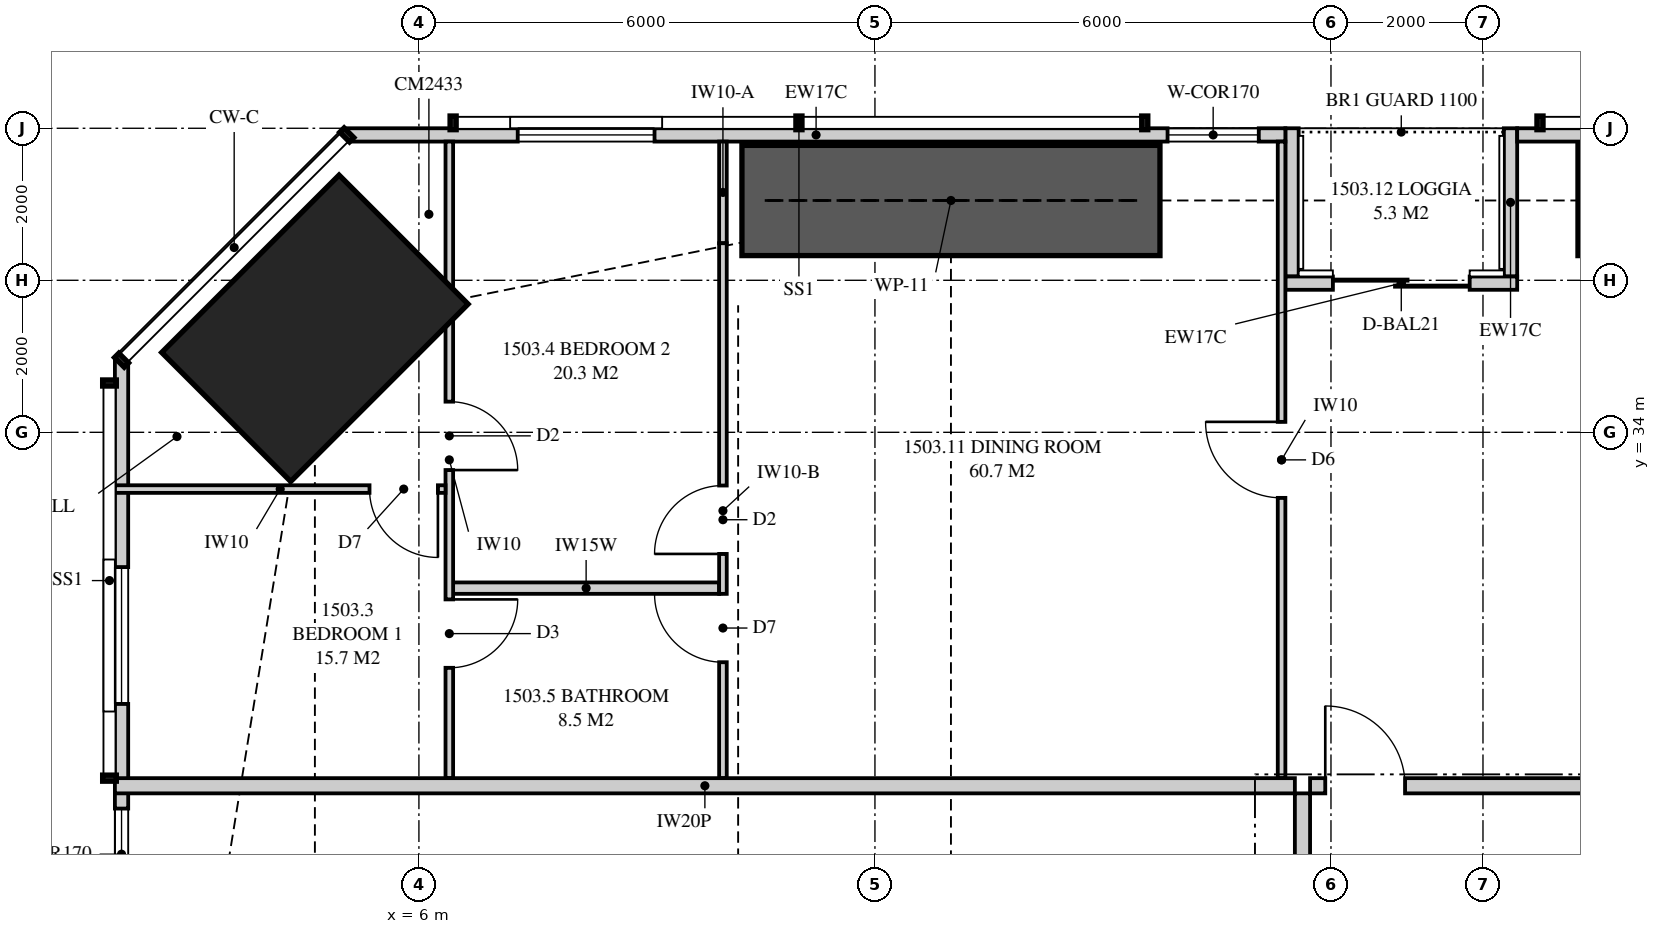
"""IFC4 building model, lengths in metres.
Left out: names, types, materials, properties, quantities, classifications, styles, units other than length and angle.
Written with IfcOpenShell. Run it as: python <this file> out.ifc"""

import sys

from ifc_helpers import new_model, si_unit, direction, frame, frame_2d, origin, origin_2d, place, context, subcontext, project, spatial, polyline, rectangle, outline, extrude, element, fill, save


model = new_model("IFC4")
c1 = context("Model", 3, precision=1e-05, world=origin(), true_north=direction((0.0, 1.0)))
c2 = subcontext(c1, "Body", "Model", "MODEL_VIEW")
j1 = project(units=[si_unit("LENGTHUNIT", "METRE"), si_unit("PLANEANGLEUNIT", "RADIAN")], contexts=[c1])
p1 = place(None, origin())
s1 = spatial("IfcSite", under=j1, at=p1, CompositionType="ELEMENT")
p2 = place(p1, origin())
s2 = spatial("IfcBuilding", under=s1, at=p2, CompositionType="ELEMENT")
p3 = place(p2, frame((0.0, 0.0, 57.85)))
s3 = spatial("IfcBuildingStorey", under=s2, at=p3, CompositionType="ELEMENT", Elevation=57.85)
p4 = place(p3, frame((4.631, 35.369, 0.0), z_axis=(0.0, 0.0, 1.0), x_axis=(0.707106781187, -0.707106781187, 0.0)))
e1 = element("IfcColumn", 1, at=p4, inside=s3, PredefinedType="COLUMN", context=c2, shape_type="SweptSolid", body=[
    extrude(rectangle(XDim=2.4, YDim=3.3, at=origin_2d()), origin(), (0.0, 0.0, 1.0), 3.35),
])
p5 = place(p3, frame((37.824, 37.913, 0.0), z_axis=(0.0, 0.0, 1.0), x_axis=(-1.0, 0.0, 0.0)))
e2 = element("IfcWall", 2, at=p5, inside=s3, PredefinedType="SOLIDWALL", context=c2, shape_type="SweptSolid", body=[
    extrude(outline(polyline([(0.0, 0.0), (17.374, 0.0), (17.374, 2.15), (2.824, 2.15), (2.824, 3.11), (2.668, 3.11), (2.668, 2.15), (2.62, 2.15), (2.62, 3.11), (0.0, 3.11), (0.0, 0.0)])), frame((0.0, 0.087, 0.0), z_axis=(0.0, -1.0, 0.0), x_axis=(1.0, 0.0, 0.0)), (0.0, 0.0, 1.0), 0.175),
])
p6 = place(p5, frame((5.699, 0.0, 0.4)))
e3 = element("IfcOpeningElement", 3, at=p6, cuts=e2, PredefinedType="OPENING", context=c2, shape_type="SweptSolid", body=[
    extrude(rectangle(XDim=1.8, YDim=1.7, at=frame_2d((0.9, 0.85))), frame((0.0, 0.097, 0.0), z_axis=(0.0, -1.0, 0.0), x_axis=(1.0, 0.0, 0.0)), (0.0, 0.0, 1.0), 0.195),
])
p7 = place(p5, frame((9.124, 0.0, 0.4)))
e4 = element("IfcOpeningElement", 4, at=p7, cuts=e2, PredefinedType="OPENING", context=c2, shape_type="SweptSolid", body=[
    extrude(rectangle(XDim=1.8, YDim=1.7, at=frame_2d((0.9, 0.85))), frame((0.0, 0.097, 0.0), z_axis=(0.0, -1.0, 0.0), x_axis=(1.0, 0.0, 0.0)), (0.0, 0.0, 1.0), 0.195),
])
p8 = place(p3, frame((17.4, 37.913, 0.0), z_axis=(0.0, 0.0, 1.0), x_axis=(-1.0, 0.0, 0.0)))
e5 = element("IfcWall", 5, at=p8, inside=s3, PredefinedType="SOLIDWALL", context=c2, shape_type="SweptSolid", body=[
    extrude(outline(polyline([(0.0, 0.0), (12.349, 0.0), (12.349, 3.11), (4.604, 3.11), (4.604, 2.15), (4.556, 2.15), (4.556, 3.11), (4.4, 3.11), (4.4, 2.15), (0.0, 2.15), (0.0, 0.0)])), frame((0.0, 0.087, 0.0), z_axis=(0.0, -1.0, 0.0), x_axis=(1.0, 0.0, 0.0)), (0.0, 0.0, 1.0), 0.175),
])
p9 = place(p8, frame((0.35, 0.0, 0.4)))
e6 = element("IfcOpeningElement", 6, at=p9, cuts=e5, PredefinedType="OPENING", context=c2, shape_type="SweptSolid", body=[
    extrude(rectangle(XDim=1.2, YDim=1.7, at=frame_2d((0.6, 0.85))), frame((0.0, 0.097, 0.0), z_axis=(0.0, -1.0, 0.0), x_axis=(1.0, 0.0, 0.0)), (0.0, 0.0, 1.0), 0.195),
])
p10 = place(p8, frame((8.3, 0.0, 0.4)))
e7 = element("IfcOpeningElement", 7, at=p10, cuts=e5, PredefinedType="OPENING", context=c2, shape_type="SweptSolid", body=[
    extrude(rectangle(XDim=1.8, YDim=1.7, at=frame_2d((0.9, 0.85))), frame((0.0, 0.097, 0.0), z_axis=(0.0, -1.0, 0.0), x_axis=(1.0, 0.0, 0.0)), (0.0, 0.0, 1.0), 0.195),
])
p11 = place(p3, frame((20.45, 35.962, 0.0), z_axis=(0.0, 0.0, 1.0), x_axis=(-1.0, 0.0, 0.0)))
e8 = element("IfcWall", 8, at=p11, inside=s3, PredefinedType="SOLIDWALL", context=c2, shape_type="SweptSolid", body=[
    extrude(rectangle(XDim=3.05, YDim=0.175, at=frame_2d((1.525, 0.0))), origin(), (0.0, 0.0, 1.0), 3.11),
])
p12 = place(p11, frame((0.625, 0.0, 0.0)))
e9 = element("IfcOpeningElement", 9, at=p12, cuts=e8, PredefinedType="OPENING", context=c2, shape_type="SweptSolid", body=[
    extrude(rectangle(XDim=1.8, YDim=2.1, at=frame_2d((0.9, 1.05))), frame((0.0, 0.097, 0.0), z_axis=(0.0, -1.0, 0.0), x_axis=(1.0, 0.0, 0.0)), (0.0, 0.0, 1.0), 0.195),
])
for number, where, z_axis, x_axis in (
    (10, (20.363, 38.0, 0.0), (0.0, 0.0, 1.0), (0.0, -1.0, 0.0)),
    (11, (17.488, 38.0, 0.0), (0.0, 0.0, 1.0), (0.0, -1.0, 0.0)),
):
    element("IfcWall", number, at=place(p3, frame(where, z_axis=z_axis, x_axis=x_axis)), inside=s3, PredefinedType="SOLIDWALL", context=c2, shape_type="SweptSolid", body=[
        extrude(outline(polyline([(0.0, 0.0), (1.95, 0.0), (1.95, 3.11), (1.75, 3.11), (1.75, 2.15), (0.15, 2.15), (0.15, 3.11), (0.0, 3.11), (0.0, 0.0)])), frame((0.0, 0.087, 0.0), z_axis=(0.0, -1.0, 0.0), x_axis=(1.0, 0.0, 0.0)), (0.0, 0.0, 1.0), 0.175),
    ])
p13 = place(p3, frame((2.087, 34.949, 0.0), z_axis=(0.0, 0.0, 1.0), x_axis=(0.0, -1.0, 0.0)))
e12 = element("IfcWall", 12, at=p13, inside=s3, PredefinedType="SOLIDWALL", context=c2, shape_type="SweptSolid", body=[
    extrude(outline(polyline([(0.0, 0.0), (15.599, 0.0), (15.599, 2.15), (9.949, 2.15), (9.949, 3.11), (9.823, 3.11), (9.823, 2.15), (9.73, 2.15), (9.73, 3.11), (0.0, 3.11), (0.0, 0.0)])), frame((0.0, 0.087, 0.0), z_axis=(0.0, -1.0, 0.0), x_axis=(1.0, 0.0, 0.0)), (0.0, 0.0, 1.0), 0.175),
])
p14 = place(p13, frame((2.722, 0.0, 0.4)))
e13 = element("IfcOpeningElement", 13, at=p14, cuts=e12, PredefinedType="OPENING", context=c2, shape_type="SweptSolid", body=[
    extrude(rectangle(XDim=1.8, YDim=1.7, at=frame_2d((0.9, 0.85))), frame((0.0, 0.097, 0.0), z_axis=(0.0, -1.0, 0.0), x_axis=(1.0, 0.0, 0.0)), (0.0, 0.0, 1.0), 0.195),
])
p15 = place(p13, frame((5.899, 0.0, 0.4)))
e14 = element("IfcOpeningElement", 14, at=p15, cuts=e12, PredefinedType="OPENING", context=c2, shape_type="SweptSolid", body=[
    extrude(rectangle(XDim=1.2, YDim=1.7, at=frame_2d((0.6, 0.85))), frame((0.0, 0.097, 0.0), z_axis=(0.0, -1.0, 0.0), x_axis=(1.0, 0.0, 0.0)), (0.0, 0.0, 1.0), 0.195),
])
p16 = place(p13, frame((12.824, 0.0, 0.4)))
e15 = element("IfcOpeningElement", 15, at=p16, cuts=e12, PredefinedType="OPENING", context=c2, shape_type="SweptSolid", body=[
    extrude(rectangle(XDim=1.8, YDim=1.7, at=frame_2d((0.9, 0.85))), frame((0.0, 0.097, 0.0), z_axis=(0.0, -1.0, 0.0), x_axis=(1.0, 0.0, 0.0)), (0.0, 0.0, 1.0), 0.195),
])
p17 = place(p3, frame((17.725, 29.35, 0.0), z_axis=(0.0, 0.0, 1.0), x_axis=(1.0, 0.0, 0.0)))
e16 = element("IfcWall", 16, at=p17, inside=s3, PredefinedType="PARTITIONING", context=c2, shape_type="SweptSolid", body=[
    extrude(outline(polyline([(0.0, 0.0), (15.275, 0.0), (15.275, 3.11), (6.612, 3.11), (6.612, 2.541), (5.938, 2.541), (5.938, 3.11), (0.0, 3.11), (0.0, 0.0)])), frame((0.0, 0.1, 0.0), z_axis=(0.0, -1.0, 0.0), x_axis=(1.0, 0.0, 0.0)), (0.0, 0.0, 1.0), 0.2),
])
p18 = place(p17, frame((0.2, 0.0, 0.0)))
e17 = element("IfcOpeningElement", 17, at=p18, cuts=e16, PredefinedType="OPENING", context=c2, shape_type="SweptSolid", body=[
    extrude(rectangle(XDim=1.05, YDim=2.2, at=frame_2d((0.525, 1.1))), frame((0.0, 0.11, 0.0), z_axis=(0.0, -1.0, 0.0), x_axis=(1.0, 0.0, 0.0)), (0.0, 0.0, 1.0), 0.22),
])
p19 = place(p3, frame((6.4, 37.825, 0.0), z_axis=(0.0, 0.0, 1.0), x_axis=(0.0, -1.0, 0.0)))
e18 = element("IfcWall", 18, at=p19, inside=s3, PredefinedType="PARTITIONING", context=c2, shape_type="SweptSolid", body=[
    extrude(outline(polyline([(0.0, 0.0), (8.375, 0.0), (8.375, 3.11), (2.978, 3.11), (2.978, 2.15), (1.224, 2.15), (1.224, 3.11), (0.0, 3.11), (0.0, 0.0)])), frame((0.0, 0.05, 0.0), z_axis=(0.0, -1.0, 0.0), x_axis=(1.0, 0.0, 0.0)), (0.0, 0.0, 1.0), 0.1),
])
p20 = place(p19, frame((3.422, 0.0, 0.0)))
e19 = element("IfcOpeningElement", 19, at=p20, cuts=e18, PredefinedType="OPENING", context=c2, shape_type="SweptSolid", body=[
    extrude(rectangle(XDim=0.9, YDim=2.1, at=frame_2d((0.45, 1.05))), frame((0.0, 0.06, 0.0), z_axis=(0.0, -1.0, 0.0), x_axis=(1.0, 0.0, 0.0)), (0.0, 0.0, 1.0), 0.12),
])
p21 = place(p19, frame((6.023, 0.0, 0.0)))
e20 = element("IfcOpeningElement", 20, at=p21, cuts=e18, PredefinedType="OPENING", context=c2, shape_type="SweptSolid", body=[
    extrude(rectangle(XDim=0.9, YDim=2.1, at=frame_2d((0.45, 1.05))), frame((0.0, 0.06, 0.0), z_axis=(0.0, -1.0, 0.0), x_axis=(1.0, 0.0, 0.0)), (0.0, 0.0, 1.0), 0.12),
])
p22 = place(p3, frame((10.0, 37.825, 0.0), z_axis=(0.0, 0.0, 1.0), x_axis=(0.0, -1.0, 0.0)))
e21 = element("IfcWall", 21, at=p22, inside=s3, PredefinedType="PARTITIONING", context=c2, shape_type="SweptSolid", body=[
    extrude(outline(polyline([(0.0, 0.0), (1.338, 0.0), (1.338, 2.15), (0.5, 2.15), (0.5, 3.11), (0.0, 3.11), (0.0, 0.0)])), frame((0.0, 0.05, 0.0), z_axis=(0.0, -1.0, 0.0), x_axis=(1.0, 0.0, 0.0)), (0.0, 0.0, 1.0), 0.1),
])
p23 = place(p3, frame((10.0, 36.487, 0.0), z_axis=(0.0, 0.0, 1.0), x_axis=(0.0, -1.0, 0.0)))
e22 = element("IfcWall", 22, at=p23, inside=s3, PredefinedType="PARTITIONING", context=c2, shape_type="SweptSolid", body=[
    extrude(outline(polyline([(0.0, 0.0), (7.037, 0.0), (7.037, 2.51), (0.917, 2.51), (0.917, 2.15), (0.0, 2.15), (0.0, 0.0)])), frame((0.0, 0.05, 0.0), z_axis=(0.0, -1.0, 0.0), x_axis=(1.0, 0.0, 0.0)), (0.0, 0.0, 1.0), 0.1),
])
p24 = place(p23, frame((3.188, 0.0, 0.0)))
e23 = element("IfcOpeningElement", 23, at=p24, cuts=e22, PredefinedType="OPENING", context=c2, shape_type="SweptSolid", body=[
    extrude(rectangle(XDim=0.9, YDim=2.1, at=frame_2d((0.45, 1.05))), frame((0.0, 0.06, 0.0), z_axis=(0.0, -1.0, 0.0), x_axis=(1.0, 0.0, 0.0)), (0.0, 0.0, 1.0), 0.12),
])
p25 = place(p23, frame((4.612, 0.0, 0.0)))
e24 = element("IfcOpeningElement", 24, at=p25, cuts=e22, PredefinedType="OPENING", context=c2, shape_type="SweptSolid", body=[
    extrude(rectangle(XDim=0.9, YDim=2.1, at=frame_2d((0.45, 1.05))), frame((0.0, 0.06, 0.0), z_axis=(0.0, -1.0, 0.0), x_axis=(1.0, 0.0, 0.0)), (0.0, 0.0, 1.0), 0.12),
])
p26 = place(p3, frame((2.0, 33.253, 0.0), z_axis=(0.0, 0.0, 1.0), x_axis=(1.0, 0.0, 0.0)))
e25 = element("IfcWall", 25, at=p26, inside=s3, PredefinedType="PARTITIONING", context=c2, shape_type="SweptSolid", body=[
    extrude(outline(polyline([(0.0, 0.0), (4.35, 0.0), (4.35, 3.11), (3.16, 3.11), (3.16, 2.15), (1.417, 2.15), (1.417, 3.11), (0.0, 3.11), (0.0, 0.0)])), frame((0.0, 0.05, 0.0), z_axis=(0.0, -1.0, 0.0), x_axis=(1.0, 0.0, 0.0)), (0.0, 0.0, 1.0), 0.1),
])
p27 = place(p26, frame((3.35, 0.0, 0.0)))
e26 = element("IfcOpeningElement", 26, at=p27, cuts=e25, PredefinedType="OPENING", context=c2, shape_type="SweptSolid", body=[
    extrude(rectangle(XDim=0.9, YDim=2.1, at=frame_2d((0.45, 1.05))), frame((0.0, 0.06, 0.0), z_axis=(0.0, -1.0, 0.0), x_axis=(1.0, 0.0, 0.0)), (0.0, 0.0, 1.0), 0.12),
])
p28 = place(p3, frame((6.45, 31.95, 0.0), z_axis=(0.0, 0.0, 1.0), x_axis=(1.0, 0.0, 0.0)))
e27 = element("IfcWall", 27, at=p28, inside=s3, PredefinedType="PLUMBINGWALL", context=c2, shape_type="SweptSolid", body=[
    extrude(outline(polyline([(0.0, 0.0), (3.5, 0.0), (3.5, 3.11), (3.5, 2.51), (2.465, 2.51), (2.465, 3.11), (0.0, 3.11), (0.0, 0.0)])), frame((0.0, 0.075, 0.0), z_axis=(0.0, -1.0, 0.0), x_axis=(1.0, 0.0, 0.0)), (0.0, 0.0, 1.0), 0.15),
])
p29 = place(p3, frame((17.35, 37.825, 0.0), z_axis=(0.0, 0.0, 1.0), x_axis=(0.0, -1.0, 0.0)))
e28 = element("IfcWall", 28, at=p29, inside=s3, PredefinedType="PARTITIONING", context=c2, shape_type="SweptSolid", body=[
    extrude(outline(polyline([(0.0, 0.0), (8.375, 0.0), (8.375, 3.11), (1.635, 3.11), (1.635, 2.15), (0.0, 2.15), (0.0, 3.11), (0.0, 0.0)])), frame((0.0, 0.05, 0.0), z_axis=(0.0, -1.0, 0.0), x_axis=(1.0, 0.0, 0.0)), (0.0, 0.0, 1.0), 0.1),
])
p30 = place(p29, frame((3.688, 0.0, 0.0)))
e29 = element("IfcOpeningElement", 29, at=p30, cuts=e28, PredefinedType="OPENING", context=c2, shape_type="SweptSolid", body=[
    extrude(rectangle(XDim=1.0, YDim=2.1, at=frame_2d((0.5, 1.05))), frame((0.0, 0.06, 0.0), z_axis=(0.0, -1.0, 0.0), x_axis=(1.0, 0.0, 0.0)), (0.0, 0.0, 1.0), 0.12),
])
p31 = place(p3, frame((2.0, 29.35, 0.0), z_axis=(0.0, 0.0, 1.0), x_axis=(1.0, 0.0, 0.0)))
e30 = element("IfcWall", 30, at=p31, inside=s3, PredefinedType="PARTITIONING", context=c2, shape_type="SweptSolid", body=[
    extrude(outline(polyline([(0.0, 0.0), (15.525, 0.0), (15.525, 3.11), (11.337, 3.11), (11.337, 2.541), (10.663, 2.541), (10.663, 3.11), (9.51, 3.11), (9.51, 2.51), (6.89, 2.51), (6.89, 3.11), (2.969, 3.11), (2.969, 2.541), (2.577, 2.541), (2.577, 2.15), (0.733, 2.15), (0.733, 3.11), (0.0, 3.11), (0.0, 0.0)])), frame((0.0, 0.1, 0.0), z_axis=(0.0, -1.0, 0.0), x_axis=(1.0, 0.0, 0.0)), (0.0, 0.0, 1.0), 0.2),
])
p32 = place(p3, frame((17.625, 24.2, 0.0), z_axis=(0.0, 0.0, 1.0), x_axis=(0.0, 1.0, 0.0)))
e31 = element("IfcWall", 31, at=p32, inside=s3, PredefinedType="PARTITIONING", context=c2, shape_type="SweptSolid", body=[
    extrude(outline(polyline([(0.0, 0.0), (5.05, 0.0), (5.05, 3.11), (1.137, 3.11), (1.137, 2.541), (0.463, 2.541), (0.463, 3.11), (0.0, 3.11), (0.0, 0.0)])), frame((0.0, 0.1, 0.0), z_axis=(0.0, -1.0, 0.0), x_axis=(1.0, 0.0, 0.0)), (0.0, 0.0, 1.0), 0.2),
])
p33 = place(p32, frame((1.075, 0.0, 0.0)))
e32 = element("IfcOpeningElement", 32, at=p33, cuts=e31, PredefinedType="OPENING", context=c2, shape_type="SweptSolid", body=[
    extrude(rectangle(XDim=1.8, YDim=2.1, at=frame_2d((0.9, 1.05))), frame((0.0, 0.11, 0.0), z_axis=(0.0, -1.0, 0.0), x_axis=(1.0, 0.0, 0.0)), (0.0, 0.0, 1.0), 0.22),
])
for number, where, z_axis, x_axis in (
    (33, (21.25, 37.05, 0.0), (0.0, 0.0, 1.0), (1.0, 0.0, 0.0)),
    (34, (10.25, 37.05, 0.0), (0.0, 0.0, 1.0), (1.0, 0.0, 0.0)),
):
    element("IfcWall", number, at=place(p3, frame(where, z_axis=z_axis, x_axis=x_axis)), inside=s3, PredefinedType="SHEAR", context=c2, shape_type="SweptSolid", body=[
        extrude(rectangle(XDim=5.5, YDim=1.45, at=frame_2d((2.75, 0.0))), origin(), (0.0, 0.0, 1.0), 3.35),
    ])
p34 = place(p12, origin())
e35 = element("IfcDoor", 35, at=p34, inside=s3, OperationType="SLIDING_TO_LEFT", PredefinedType="DOOR", context=c2, shape_type="SweptSolid", body=[
    extrude(rectangle(XDim=1.8, YDim=2.1, at=frame_2d((0.9, 1.05))), frame((0.0, 0.025, 0.0), z_axis=(0.0, -1.0, 0.0), x_axis=(1.0, 0.0, 0.0)), (0.0, 0.0, 1.0), 0.05),
])
fill(e9, e35)
p35 = place(p9, origin())
e36 = element("IfcWindow", 36, at=p35, inside=s3, PartitioningType="SINGLE_PANEL", PredefinedType="WINDOW", context=c2, shape_type="SweptSolid", body=[
    extrude(rectangle(XDim=1.2, YDim=1.7, at=frame_2d((0.6, 0.85))), frame((0.0, 0.03, 0.0), z_axis=(0.0, -1.0, 0.0), x_axis=(1.0, 0.0, 0.0)), (0.0, 0.0, 1.0), 0.06),
])
fill(e6, e36)
p36 = place(p10, origin())
e37 = element("IfcWindow", 37, at=p36, inside=s3, PartitioningType="SINGLE_PANEL", PredefinedType="WINDOW", context=c2, shape_type="SweptSolid", body=[
    extrude(rectangle(XDim=1.8, YDim=1.7, at=frame_2d((0.9, 0.85))), frame((0.0, 0.03, 0.0), z_axis=(0.0, -1.0, 0.0), x_axis=(1.0, 0.0, 0.0)), (0.0, 0.0, 1.0), 0.06),
])
fill(e7, e37)
p37 = place(p14, origin())
e38 = element("IfcWindow", 38, at=p37, inside=s3, PartitioningType="SINGLE_PANEL", PredefinedType="WINDOW", context=c2, shape_type="SweptSolid", body=[
    extrude(rectangle(XDim=1.8, YDim=1.7, at=frame_2d((0.9, 0.85))), frame((0.0, 0.03, 0.0), z_axis=(0.0, -1.0, 0.0), x_axis=(1.0, 0.0, 0.0)), (0.0, 0.0, 1.0), 0.06),
])
fill(e13, e38)
p38 = place(p15, origin())
e39 = element("IfcWindow", 39, at=p38, inside=s3, PartitioningType="SINGLE_PANEL", PredefinedType="WINDOW", context=c2, shape_type="SweptSolid", body=[
    extrude(rectangle(XDim=1.2, YDim=1.7, at=frame_2d((0.6, 0.85))), frame((0.0, 0.03, 0.0), z_axis=(0.0, -1.0, 0.0), x_axis=(1.0, 0.0, 0.0)), (0.0, 0.0, 1.0), 0.06),
])
fill(e14, e39)
p39 = place(p18, origin())
e40 = element("IfcDoor", 40, at=p39, inside=s3, OperationType="SINGLE_SWING_LEFT", PredefinedType="DOOR", context=c2, shape_type="SweptSolid", body=[
    extrude(rectangle(XDim=1.05, YDim=2.2, at=frame_2d((0.525, 1.1))), frame((0.0, 0.025, 0.0), z_axis=(0.0, -1.0, 0.0), x_axis=(1.0, 0.0, 0.0)), (0.0, 0.0, 1.0), 0.05),
])
fill(e17, e40)
p40 = place(p27, frame((0.9, 0.0, 0.0), z_axis=(0.0, 0.0, 1.0), x_axis=(-1.0, 0.0, 0.0)))
e41 = element("IfcDoor", 41, at=p40, inside=s3, OperationType="SINGLE_SWING_LEFT", PredefinedType="DOOR", context=c2, shape_type="SweptSolid", body=[
    extrude(rectangle(XDim=0.9, YDim=2.1, at=frame_2d((0.45, 1.05))), frame((0.0, 0.025, 0.0), z_axis=(0.0, -1.0, 0.0), x_axis=(1.0, 0.0, 0.0)), (0.0, 0.0, 1.0), 0.05),
])
fill(e26, e41)
p41 = place(p20, origin())
e42 = element("IfcDoor", 42, at=p41, inside=s3, OperationType="SINGLE_SWING_RIGHT", PredefinedType="DOOR", context=c2, shape_type="SweptSolid", body=[
    extrude(rectangle(XDim=0.9, YDim=2.1, at=frame_2d((0.45, 1.05))), frame((0.0, 0.025, 0.0), z_axis=(0.0, -1.0, 0.0), x_axis=(1.0, 0.0, 0.0)), (0.0, 0.0, 1.0), 0.05),
])
fill(e19, e42)
p42 = place(p24, frame((0.9, 0.0, 0.0), z_axis=(0.0, 0.0, 1.0), x_axis=(-1.0, 0.0, 0.0)))
e43 = element("IfcDoor", 43, at=p42, inside=s3, OperationType="SINGLE_SWING_LEFT", PredefinedType="DOOR", context=c2, shape_type="SweptSolid", body=[
    extrude(rectangle(XDim=0.9, YDim=2.1, at=frame_2d((0.45, 1.05))), frame((0.0, 0.025, 0.0), z_axis=(0.0, -1.0, 0.0), x_axis=(1.0, 0.0, 0.0)), (0.0, 0.0, 1.0), 0.05),
])
fill(e23, e43)
p43 = place(p25, frame((0.9, 0.0, 0.0), z_axis=(0.0, 0.0, 1.0), x_axis=(-1.0, 0.0, 0.0)))
e44 = element("IfcDoor", 44, at=p43, inside=s3, OperationType="SINGLE_SWING_RIGHT", PredefinedType="DOOR", context=c2, shape_type="SweptSolid", body=[
    extrude(rectangle(XDim=0.9, YDim=2.1, at=frame_2d((0.45, 1.05))), frame((0.0, 0.025, 0.0), z_axis=(0.0, -1.0, 0.0), x_axis=(1.0, 0.0, 0.0)), (0.0, 0.0, 1.0), 0.05),
])
fill(e24, e44)
p44 = place(p21, origin())
e45 = element("IfcDoor", 45, at=p44, inside=s3, OperationType="SINGLE_SWING_LEFT", PredefinedType="DOOR", context=c2, shape_type="SweptSolid", body=[
    extrude(rectangle(XDim=0.9, YDim=2.1, at=frame_2d((0.45, 1.05))), frame((0.0, 0.025, 0.0), z_axis=(0.0, -1.0, 0.0), x_axis=(1.0, 0.0, 0.0)), (0.0, 0.0, 1.0), 0.05),
])
fill(e20, e45)
p45 = place(p30, frame((1.0, 0.0, 0.0), z_axis=(0.0, 0.0, 1.0), x_axis=(-1.0, 0.0, 0.0)))
e46 = element("IfcDoor", 46, at=p45, inside=s3, OperationType="SINGLE_SWING_RIGHT", PredefinedType="DOOR", context=c2, shape_type="SweptSolid", body=[
    extrude(rectangle(XDim=1.0, YDim=2.1, at=frame_2d((0.5, 1.05))), frame((0.0, 0.025, 0.0), z_axis=(0.0, -1.0, 0.0), x_axis=(1.0, 0.0, 0.0)), (0.0, 0.0, 1.0), 0.05),
])
fill(e29, e46)
save(model, sys.argv[1])
